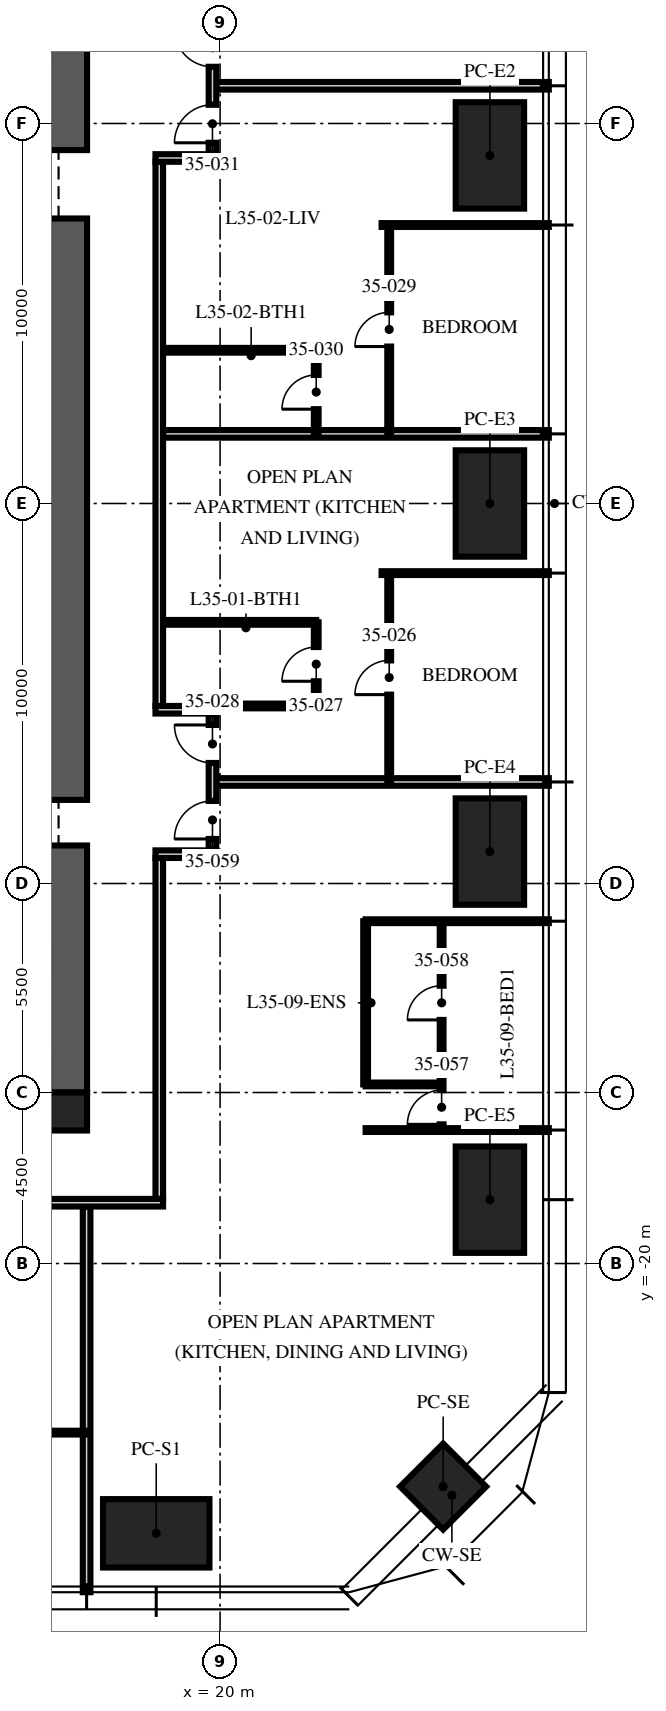
"""IFC4 building model, lengths in metres.
Left out: names, types, materials, properties, quantities, classifications, styles, units other than length and angle.
Written with IfcOpenShell. Run it as: python <this file> out.ifc"""

import sys

from ifc_helpers import new_model, si_unit, direction, frame, frame_2d, origin, origin_2d, place, context, subcontext, project, spatial, rectangle, extrude, element, fill, save


model = new_model("IFC4")
c1 = context("Model", 3, precision=1e-05, world=origin(), true_north=direction((0.0, 1.0)))
c2 = subcontext(c1, "Body", "Model", "MODEL_VIEW")
j1 = project(units=[si_unit("LENGTHUNIT", "METRE"), si_unit("PLANEANGLEUNIT", "RADIAN")], contexts=[c1])
p1 = place(None, origin())
s1 = spatial("IfcSite", under=j1, at=p1, CompositionType="ELEMENT")
p2 = place(p1, origin())
s2 = spatial("IfcBuilding", under=s1, at=p2, CompositionType="ELEMENT")
p3 = place(p2, frame((0.0, 0.0, 141.0)))
s3 = spatial("IfcBuildingStorey", under=s2, at=p3, CompositionType="ELEMENT", Elevation=141.0)
p4 = place(p3, frame((15.5, -15.5, -0.25), z_axis=(0.0, 0.0, 1.0), x_axis=(0.0, 1.0, 0.0)))
e1 = element("IfcWall", 1, at=p4, inside=s3, PredefinedType="SHEAR", context=c2, shape_type="SweptSolid", body=[
    extrude(rectangle(XDim=31.0, YDim=2.0, at=frame_2d((15.5, 0.0))), origin(), (0.0, 0.0, 1.0), 3.75),
])
p5 = place(p4, frame((6.5, 0.0, 0.25)))
e2 = element("IfcOpeningElement", 2, at=p5, cuts=e1, PredefinedType="OPENING", context=c2, shape_type="SweptSolid", body=[
    extrude(rectangle(XDim=1.2, YDim=2.1, at=frame_2d((0.6, 1.05))), frame((0.0, 1.01, 0.0), z_axis=(0.0, -1.0, 0.0), x_axis=(1.0, 0.0, 0.0)), (0.0, 0.0, 1.0), 2.02),
])
p6 = place(p4, frame((23.0, 0.0, 0.25)))
e3 = element("IfcOpeningElement", 3, at=p6, cuts=e1, PredefinedType="OPENING", context=c2, shape_type="SweptSolid", body=[
    extrude(rectangle(XDim=1.8, YDim=2.1, at=frame_2d((0.9, 1.05))), frame((0.0, 1.01, 0.0), z_axis=(0.0, -1.0, 0.0), x_axis=(1.0, 0.0, 0.0)), (0.0, 0.0, 1.0), 2.02),
])
p7 = place(p3, frame((16.0, -16.0, -0.25), z_axis=(0.0, 0.0, 1.0), x_axis=(1.0, 0.0, 0.0)))
e4 = element("IfcColumn", 4, at=p7, inside=s3, PredefinedType="COLUMN", context=c2, shape_type="SweptSolid", body=[
    extrude(rectangle(XDim=1.0, YDim=1.0, at=origin_2d()), origin(), (0.0, 0.0, 1.0), 3.75),
])
for number, where, z_axis, x_axis in (
    (5, (27.1, 9.16, 0.0), (0.0, 0.0, 1.0), (0.0, 1.0, 0.0)),
    (6, (27.1, 0.0, 0.0), (0.0, 0.0, 1.0), (0.0, 1.0, 0.0)),
    (7, (27.1, -9.16, 0.0), (0.0, 0.0, 1.0), (0.0, 1.0, 0.0)),
    (8, (27.1, -18.32, 0.0), (0.0, 0.0, 1.0), (0.0, 1.0, 0.0)),
    (9, (18.32, -27.1, 0.0), (0.0, 0.0, 1.0), (1.0, 0.0, 0.0)),
):
    element("IfcColumn", number, at=place(p3, frame(where, z_axis=z_axis, x_axis=x_axis)), inside=s3, PredefinedType="COLUMN", context=c2, shape_type="SweptSolid", body=[
        extrude(rectangle(XDim=2.8, YDim=1.8, at=origin_2d()), origin(), (0.0, 0.0, 1.0), 3.75),
    ])
p8 = place(p3, frame((25.87, -25.87, 0.0), z_axis=(0.0, 0.0, 1.0), x_axis=(0.707106781187, 0.707106781187, 0.0)))
e10 = element("IfcColumn", 10, at=p8, inside=s3, PredefinedType="COLUMN", context=c2, shape_type="SweptSolid", body=[
    extrude(rectangle(XDim=1.6, YDim=1.6, at=origin_2d()), origin(), (0.0, 0.0, 1.0), 3.75),
])
p9 = place(p3, frame((19.9, -7.328, 0.0), z_axis=(0.0, 0.0, 1.0), x_axis=(1.0, 0.0, 0.0)))
e11 = element("IfcWall", 11, at=p9, inside=s3, PredefinedType="PARTITIONING", context=c2, shape_type="SweptSolid", body=[
    extrude(rectangle(XDim=8.75, YDim=0.2, at=frame_2d((4.375, 0.0))), origin(), (0.0, 0.0, 1.0), 2.81),
])
p10 = place(p3, frame((24.25, -1.832, 0.0), z_axis=(0.0, 0.0, 1.0), x_axis=(1.0, 0.0, 0.0)))
e12 = element("IfcWall", 12, at=p10, inside=s3, PredefinedType="PARTITIONING", context=c2, shape_type="SweptSolid", body=[
    extrude(rectangle(XDim=4.4, YDim=0.1, at=frame_2d((2.2, 0.0))), origin(), (0.0, 0.0, 1.0), 2.81),
])
p11 = place(p3, frame((18.5, 1.832, 0.0), z_axis=(0.0, 0.0, 1.0), x_axis=(1.0, 0.0, 0.0)))
e13 = element("IfcWall", 13, at=p11, inside=s3, PredefinedType="PARTITIONING", context=c2, shape_type="SweptSolid", body=[
    extrude(rectangle(XDim=10.15, YDim=0.2, at=frame_2d((5.075, 0.0))), origin(), (0.0, 0.0, 1.0), 2.81),
])
p12 = place(p3, frame((24.25, 7.328, 0.0), z_axis=(0.0, 0.0, 1.0), x_axis=(1.0, 0.0, 0.0)))
e14 = element("IfcWall", 14, at=p12, inside=s3, PredefinedType="PARTITIONING", context=c2, shape_type="SweptSolid", body=[
    extrude(rectangle(XDim=4.4, YDim=0.1, at=frame_2d((2.2, 0.0))), origin(), (0.0, 0.0, 1.0), 2.81),
])
p13 = place(p3, frame((19.9, 10.992, 0.0), z_axis=(0.0, 0.0, 1.0), x_axis=(1.0, 0.0, 0.0)))
e15 = element("IfcWall", 15, at=p13, inside=s3, PredefinedType="PARTITIONING", context=c2, shape_type="SweptSolid", body=[
    extrude(rectangle(XDim=8.75, YDim=0.2, at=frame_2d((4.375, 0.0))), origin(), (0.0, 0.0, 1.0), 2.81),
])
p14 = place(p3, frame((16.488, -18.5, 0.0), z_axis=(0.0, 0.0, 1.0), x_axis=(0.0, -1.0, 0.0)))
e16 = element("IfcWall", 16, at=p14, inside=s3, PredefinedType="PARTITIONING", context=c2, shape_type="SweptSolid", body=[
    extrude(rectangle(XDim=10.15, YDim=0.2, at=frame_2d((5.075, 0.0))), origin(), (0.0, 0.0, 1.0), 2.81),
])
for number, where, z_axis, x_axis in (
    (17, (23.83, -16.488, 0.0), (0.0, 0.0, 1.0), (1.0, 0.0, 0.0)),
    (18, (23.83, -10.992, 0.0), (0.0, 0.0, 1.0), (1.0, 0.0, 0.0)),
):
    element("IfcWall", number, at=place(p3, frame(where, z_axis=z_axis, x_axis=x_axis)), inside=s3, PredefinedType="PARTITIONING", context=c2, shape_type="SweptSolid", body=[
        extrude(rectangle(XDim=4.82, YDim=0.1, at=frame_2d((2.41, 0.0))), origin(), (0.0, 0.0, 1.0), 2.81),
    ])
p15 = place(p3, frame((24.45, -7.328, 0.0), z_axis=(0.0, 0.0, 1.0), x_axis=(0.0, 1.0, 0.0)))
e19 = element("IfcWall", 19, at=p15, inside=s3, PredefinedType="PARTITIONING", context=c2, shape_type="SweptSolid", body=[
    extrude(rectangle(XDim=5.496, YDim=0.1, at=frame_2d((2.748, 0.0))), origin(), (0.0, 0.0, 1.0), 2.81),
])
p16 = place(p15, frame((2.298, 0.0, 0.0)))
e20 = element("IfcOpeningElement", 20, at=p16, cuts=e19, PredefinedType="OPENING", context=c2, shape_type="SweptSolid", body=[
    extrude(rectangle(XDim=0.9, YDim=2.1, at=frame_2d((0.45, 1.05))), frame((0.0, 0.06, 0.0), z_axis=(0.0, -1.0, 0.0), x_axis=(1.0, 0.0, 0.0)), (0.0, 0.0, 1.0), 0.12),
])
p17 = place(p3, frame((22.53, -5.328, 0.0), z_axis=(0.0, 0.0, 1.0), x_axis=(0.0, 1.0, 0.0)))
e21 = element("IfcWall", 21, at=p17, inside=s3, PredefinedType="PARTITIONING", context=c2, shape_type="SweptSolid", body=[
    extrude(rectangle(XDim=2.2, YDim=0.125, at=frame_2d((1.1, 0.0))), origin(), (0.0, 0.0, 1.0), 2.81),
])
p18 = place(p17, frame((0.65, 0.0, 0.0)))
e22 = element("IfcOpeningElement", 22, at=p18, cuts=e21, PredefinedType="OPENING", context=c2, shape_type="SweptSolid", body=[
    extrude(rectangle(XDim=0.9, YDim=2.1, at=frame_2d((0.45, 1.05))), frame((0.0, 0.073, 0.0), z_axis=(0.0, -1.0, 0.0), x_axis=(1.0, 0.0, 0.0)), (0.0, 0.0, 1.0), 0.145),
])
p19 = place(p3, frame((19.97, -5.328, 0.0), z_axis=(0.0, 0.0, 1.0), x_axis=(1.0, 0.0, 0.0)))
e23 = element("IfcWall", 23, at=p19, inside=s3, PredefinedType="PARTITIONING", context=c2, shape_type="SweptSolid", body=[
    extrude(rectangle(XDim=2.56, YDim=0.125, at=frame_2d((1.28, 0.0))), origin(), (0.0, 0.0, 1.0), 3.5),
])
p20 = place(p3, frame((18.5, -3.128, 0.0), z_axis=(0.0, 0.0, 1.0), x_axis=(1.0, 0.0, 0.0)))
e24 = element("IfcWall", 24, at=p20, inside=s3, PredefinedType="PARTITIONING", context=c2, shape_type="SweptSolid", body=[
    extrude(rectangle(XDim=4.03, YDim=0.125, at=frame_2d((2.015, 0.0))), origin(), (0.0, 0.0, 1.0), 3.5),
])
p21 = place(p3, frame((24.45, 1.832, 0.0), z_axis=(0.0, 0.0, 1.0), x_axis=(0.0, 1.0, 0.0)))
e25 = element("IfcWall", 25, at=p21, inside=s3, PredefinedType="PARTITIONING", context=c2, shape_type="SweptSolid", body=[
    extrude(rectangle(XDim=5.496, YDim=0.1, at=frame_2d((2.748, 0.0))), origin(), (0.0, 0.0, 1.0), 2.81),
])
p22 = place(p21, frame((2.298, 0.0, 0.0)))
e26 = element("IfcOpeningElement", 26, at=p22, cuts=e25, PredefinedType="OPENING", context=c2, shape_type="SweptSolid", body=[
    extrude(rectangle(XDim=0.9, YDim=2.1, at=frame_2d((0.45, 1.05))), frame((0.0, 0.06, 0.0), z_axis=(0.0, -1.0, 0.0), x_axis=(1.0, 0.0, 0.0)), (0.0, 0.0, 1.0), 0.12),
])
p23 = place(p3, frame((22.53, 1.832, 0.0), z_axis=(0.0, 0.0, 1.0), x_axis=(0.0, 1.0, 0.0)))
e27 = element("IfcWall", 27, at=p23, inside=s3, PredefinedType="PARTITIONING", context=c2, shape_type="SweptSolid", body=[
    extrude(rectangle(XDim=2.2, YDim=0.125, at=frame_2d((1.1, 0.0))), origin(), (0.0, 0.0, 1.0), 3.5),
])
p24 = place(p23, frame((0.65, 0.0, 0.0)))
e28 = element("IfcOpeningElement", 28, at=p24, cuts=e27, PredefinedType="OPENING", context=c2, shape_type="SweptSolid", body=[
    extrude(rectangle(XDim=0.9, YDim=2.1, at=frame_2d((0.45, 1.05))), frame((0.0, 0.073, 0.0), z_axis=(0.0, -1.0, 0.0), x_axis=(1.0, 0.0, 0.0)), (0.0, 0.0, 1.0), 0.145),
])
p25 = place(p3, frame((18.5, 4.032, 0.0), z_axis=(0.0, 0.0, 1.0), x_axis=(1.0, 0.0, 0.0)))
e29 = element("IfcWall", 29, at=p25, inside=s3, PredefinedType="PARTITIONING", context=c2, shape_type="SweptSolid", body=[
    extrude(rectangle(XDim=4.03, YDim=0.125, at=frame_2d((2.015, 0.0))), origin(), (0.0, 0.0, 1.0), 3.5),
])
p26 = place(p3, frame((10.992, -24.45, 0.0), z_axis=(0.0, 0.0, 1.0), x_axis=(1.0, 0.0, 0.0)))
e30 = element("IfcWall", 30, at=p26, inside=s3, PredefinedType="PARTITIONING", context=c2, shape_type="SweptSolid", body=[
    extrude(rectangle(XDim=5.496, YDim=0.1, at=frame_2d((2.748, 0.0))), origin(), (0.0, 0.0, 1.0), 2.81),
])
p27 = place(p26, frame((2.298, 0.0, 0.0)))
e31 = element("IfcOpeningElement", 31, at=p27, cuts=e30, PredefinedType="OPENING", context=c2, shape_type="SweptSolid", body=[
    extrude(rectangle(XDim=0.9, YDim=2.1, at=frame_2d((0.45, 1.05))), frame((0.0, 0.06, 0.0), z_axis=(0.0, -1.0, 0.0), x_axis=(1.0, 0.0, 0.0)), (0.0, 0.0, 1.0), 0.12),
])
p28 = place(p3, frame((25.83, -16.488, 0.0), z_axis=(0.0, 0.0, 1.0), x_axis=(0.0, 1.0, 0.0)))
e32 = element("IfcWall", 32, at=p28, inside=s3, PredefinedType="PARTITIONING", context=c2, shape_type="SweptSolid", body=[
    extrude(rectangle(XDim=5.496, YDim=0.1, at=frame_2d((2.748, 0.0))), origin(), (0.0, 0.0, 1.0), 2.81),
])
p29 = place(p28, frame((0.15, 0.0, 0.0)))
e33 = element("IfcOpeningElement", 33, at=p29, cuts=e32, PredefinedType="OPENING", context=c2, shape_type="SweptSolid", body=[
    extrude(rectangle(XDim=0.9, YDim=2.1, at=frame_2d((0.45, 1.05))), frame((0.0, 0.06, 0.0), z_axis=(0.0, -1.0, 0.0), x_axis=(1.0, 0.0, 0.0)), (0.0, 0.0, 1.0), 0.12),
])
p30 = place(p28, frame((2.898, 0.0, 0.0)))
e34 = element("IfcOpeningElement", 34, at=p30, cuts=e32, PredefinedType="OPENING", context=c2, shape_type="SweptSolid", body=[
    extrude(rectangle(XDim=0.9, YDim=2.1, at=frame_2d((0.45, 1.05))), frame((0.0, 0.06, 0.0), z_axis=(0.0, -1.0, 0.0), x_axis=(1.0, 0.0, 0.0)), (0.0, 0.0, 1.0), 0.12),
])
p31 = place(p3, frame((23.83, -15.288, 0.0), z_axis=(0.0, 0.0, 1.0), x_axis=(1.0, 0.0, 0.0)))
e35 = element("IfcWall", 35, at=p31, inside=s3, PredefinedType="PARTITIONING", context=c2, shape_type="SweptSolid", body=[
    extrude(rectangle(XDim=2.0, YDim=0.1, at=frame_2d((1.0, 0.0))), origin(), (0.0, 0.0, 1.0), 3.5),
])
p32 = place(p3, frame((23.83, -15.288, 0.0), z_axis=(0.0, 0.0, 1.0), x_axis=(0.0, 1.0, 0.0)))
e36 = element("IfcWall", 36, at=p32, inside=s3, PredefinedType="PARTITIONING", context=c2, shape_type="SweptSolid", body=[
    extrude(rectangle(XDim=4.296, YDim=0.125, at=frame_2d((2.148, 0.0))), origin(), (0.0, 0.0, 1.0), 2.81),
])
p33 = place(p3, frame((18.4, -18.3, 0.0), z_axis=(0.0, 0.0, 1.0), x_axis=(0.0, 1.0, 0.0)))
e37 = element("IfcWall", 37, at=p33, inside=s3, PredefinedType="PARTITIONING", context=c2, shape_type="SweptSolid", body=[
    extrude(rectangle(XDim=8.972, YDim=0.2, at=frame_2d((4.486, 0.0))), origin(), (0.0, 0.0, 1.0), 2.3),
])
p34 = place(p3, frame((18.3, -9.228, 0.0), z_axis=(0.0, 0.0, 1.0), x_axis=(1.0, 0.0, 0.0)))
e38 = element("IfcWall", 38, at=p34, inside=s3, PredefinedType="PARTITIONING", context=c2, shape_type="SweptSolid", body=[
    extrude(rectangle(XDim=1.6, YDim=0.2, at=frame_2d((0.8, 0.0))), origin(), (0.0, 0.0, 1.0), 2.7),
])
p35 = place(p3, frame((18.3, -5.428, 0.0), z_axis=(0.0, 0.0, 1.0), x_axis=(1.0, 0.0, 0.0)))
e39 = element("IfcWall", 39, at=p35, inside=s3, PredefinedType="PARTITIONING", context=c2, shape_type="SweptSolid", body=[
    extrude(rectangle(XDim=1.6, YDim=0.2, at=frame_2d((0.8, 0.0))), origin(), (0.0, 0.0, 1.0), 3.5),
])
p36 = place(p3, frame((19.8, -9.128, 0.0), z_axis=(0.0, 0.0, 1.0), x_axis=(0.0, 1.0, 0.0)))
e40 = element("IfcWall", 40, at=p36, inside=s3, PredefinedType="PARTITIONING", context=c2, shape_type="SweptSolid", body=[
    extrude(rectangle(XDim=3.6, YDim=0.2, at=frame_2d((1.8, 0.0))), origin(), (0.0, 0.0, 1.0), 2.7),
])
p37 = place(p36, frame((2.3, 0.0, 0.0)))
e41 = element("IfcOpeningElement", 41, at=p37, cuts=e40, PredefinedType="OPENING", context=c2, shape_type="SweptSolid", body=[
    extrude(rectangle(XDim=1.0, YDim=2.2, at=frame_2d((0.5, 1.1))), frame((0.0, 0.11, 0.0), z_axis=(0.0, -1.0, 0.0), x_axis=(1.0, 0.0, 0.0)), (0.0, 0.0, 1.0), 0.22),
])
p38 = place(p36, frame((0.3, 0.0, 0.0)))
e42 = element("IfcOpeningElement", 42, at=p38, cuts=e40, PredefinedType="OPENING", context=c2, shape_type="SweptSolid", body=[
    extrude(rectangle(XDim=1.0, YDim=2.2, at=frame_2d((0.5, 1.1))), frame((0.0, 0.11, 0.0), z_axis=(0.0, -1.0, 0.0), x_axis=(1.0, 0.0, 0.0)), (0.0, 0.0, 1.0), 0.22),
])
p39 = place(p3, frame((18.4, -5.328, 0.0), z_axis=(0.0, 0.0, 1.0), x_axis=(0.0, 1.0, 0.0)))
e43 = element("IfcWall", 43, at=p39, inside=s3, PredefinedType="PARTITIONING", context=c2, shape_type="SweptSolid", body=[
    extrude(rectangle(XDim=14.32, YDim=0.2, at=frame_2d((7.16, 0.0))), origin(), (0.0, 0.0, 1.0), 2.7),
])
p40 = place(p3, frame((18.3, 9.092, 0.0), z_axis=(0.0, 0.0, 1.0), x_axis=(1.0, 0.0, 0.0)))
e44 = element("IfcWall", 44, at=p40, inside=s3, PredefinedType="PARTITIONING", context=c2, shape_type="SweptSolid", body=[
    extrude(rectangle(XDim=1.6, YDim=0.2, at=frame_2d((0.8, 0.0))), origin(), (0.0, 0.0, 1.0), 2.7),
])
p41 = place(p3, frame((19.8, 9.192, 0.0), z_axis=(0.0, 0.0, 1.0), x_axis=(0.0, 1.0, 0.0)))
e45 = element("IfcWall", 45, at=p41, inside=s3, PredefinedType="PARTITIONING", context=c2, shape_type="SweptSolid", body=[
    extrude(rectangle(XDim=3.6, YDim=0.2, at=frame_2d((1.8, 0.0))), origin(), (0.0, 0.0, 1.0), 2.7),
])
p42 = place(p41, frame((0.3, 0.0, 0.0)))
e46 = element("IfcOpeningElement", 46, at=p42, cuts=e45, PredefinedType="OPENING", context=c2, shape_type="SweptSolid", body=[
    extrude(rectangle(XDim=1.0, YDim=2.2, at=frame_2d((0.5, 1.1))), frame((0.0, 0.11, 0.0), z_axis=(0.0, -1.0, 0.0), x_axis=(1.0, 0.0, 0.0)), (0.0, 0.0, 1.0), 0.22),
])
p43 = place(p41, frame((2.3, 0.0, 0.0)))
e47 = element("IfcOpeningElement", 47, at=p43, cuts=e45, PredefinedType="OPENING", context=c2, shape_type="SweptSolid", body=[
    extrude(rectangle(XDim=1.0, YDim=2.2, at=frame_2d((0.5, 1.1))), frame((0.0, 0.11, 0.0), z_axis=(0.0, -1.0, 0.0), x_axis=(1.0, 0.0, 0.0)), (0.0, 0.0, 1.0), 0.22),
])
p44 = place(p3, frame((18.5, -18.4, 0.0), z_axis=(0.0, 0.0, 1.0), x_axis=(-1.0, 0.0, 0.0)))
e48 = element("IfcWall", 48, at=p44, inside=s3, PredefinedType="PARTITIONING", context=c2, shape_type="SweptSolid", body=[
    extrude(rectangle(XDim=12.9, YDim=0.2, at=frame_2d((6.45, 0.0))), origin(), (0.0, 0.0, 1.0), 2.3),
])
p45 = place(p16, origin())
e49 = element("IfcDoor", 49, at=p45, inside=s3, OperationType="SINGLE_SWING_LEFT", PredefinedType="DOOR", context=c2, shape_type="SweptSolid", body=[
    extrude(rectangle(XDim=0.9, YDim=2.1, at=frame_2d((0.45, 1.05))), frame((0.0, 0.025, 0.0), z_axis=(0.0, -1.0, 0.0), x_axis=(1.0, 0.0, 0.0)), (0.0, 0.0, 1.0), 0.05),
])
fill(e20, e49)
p46 = place(p18, origin())
e50 = element("IfcDoor", 50, at=p46, inside=s3, OperationType="SINGLE_SWING_LEFT", PredefinedType="DOOR", context=c2, shape_type="SweptSolid", body=[
    extrude(rectangle(XDim=0.9, YDim=2.1, at=frame_2d((0.45, 1.05))), frame((0.0, 0.025, 0.0), z_axis=(0.0, -1.0, 0.0), x_axis=(1.0, 0.0, 0.0)), (0.0, 0.0, 1.0), 0.05),
])
fill(e22, e50)
p47 = place(p37, origin())
e51 = element("IfcDoor", 51, at=p47, inside=s3, OperationType="SINGLE_SWING_RIGHT", PredefinedType="DOOR", context=c2, shape_type="SweptSolid", body=[
    extrude(rectangle(XDim=1.0, YDim=2.2, at=frame_2d((0.5, 1.1))), frame((0.0, 0.025, 0.0), z_axis=(0.0, -1.0, 0.0), x_axis=(1.0, 0.0, 0.0)), (0.0, 0.0, 1.0), 0.05),
])
fill(e41, e51)
p48 = place(p22, origin())
e52 = element("IfcDoor", 52, at=p48, inside=s3, OperationType="SINGLE_SWING_LEFT", PredefinedType="DOOR", context=c2, shape_type="SweptSolid", body=[
    extrude(rectangle(XDim=0.9, YDim=2.1, at=frame_2d((0.45, 1.05))), frame((0.0, 0.025, 0.0), z_axis=(0.0, -1.0, 0.0), x_axis=(1.0, 0.0, 0.0)), (0.0, 0.0, 1.0), 0.05),
])
fill(e26, e52)
p49 = place(p24, origin())
e53 = element("IfcDoor", 53, at=p49, inside=s3, OperationType="SINGLE_SWING_LEFT", PredefinedType="DOOR", context=c2, shape_type="SweptSolid", body=[
    extrude(rectangle(XDim=0.9, YDim=2.1, at=frame_2d((0.45, 1.05))), frame((0.0, 0.025, 0.0), z_axis=(0.0, -1.0, 0.0), x_axis=(1.0, 0.0, 0.0)), (0.0, 0.0, 1.0), 0.05),
])
fill(e28, e53)
p50 = place(p42, origin())
e54 = element("IfcDoor", 54, at=p50, inside=s3, OperationType="SINGLE_SWING_LEFT", PredefinedType="DOOR", context=c2, shape_type="SweptSolid", body=[
    extrude(rectangle(XDim=1.0, YDim=2.2, at=frame_2d((0.5, 1.1))), frame((0.0, 0.025, 0.0), z_axis=(0.0, -1.0, 0.0), x_axis=(1.0, 0.0, 0.0)), (0.0, 0.0, 1.0), 0.05),
])
fill(e46, e54)
p51 = place(p43, origin())
e55 = element("IfcDoor", 55, at=p51, inside=s3, OperationType="SINGLE_SWING_RIGHT", PredefinedType="DOOR", context=c2, shape_type="SweptSolid", body=[
    extrude(rectangle(XDim=1.0, YDim=2.2, at=frame_2d((0.5, 1.1))), frame((0.0, 0.025, 0.0), z_axis=(0.0, -1.0, 0.0), x_axis=(1.0, 0.0, 0.0)), (0.0, 0.0, 1.0), 0.05),
])
fill(e47, e55)
p52 = place(p29, origin())
e56 = element("IfcDoor", 56, at=p52, inside=s3, OperationType="SINGLE_SWING_LEFT", PredefinedType="DOOR", context=c2, shape_type="SweptSolid", body=[
    extrude(rectangle(XDim=0.9, YDim=2.1, at=frame_2d((0.45, 1.05))), frame((0.0, 0.025, 0.0), z_axis=(0.0, -1.0, 0.0), x_axis=(1.0, 0.0, 0.0)), (0.0, 0.0, 1.0), 0.05),
])
fill(e33, e56)
p53 = place(p30, origin())
e57 = element("IfcDoor", 57, at=p53, inside=s3, OperationType="SINGLE_SWING_LEFT", PredefinedType="DOOR", context=c2, shape_type="SweptSolid", body=[
    extrude(rectangle(XDim=0.9, YDim=2.1, at=frame_2d((0.45, 1.05))), frame((0.0, 0.025, 0.0), z_axis=(0.0, -1.0, 0.0), x_axis=(1.0, 0.0, 0.0)), (0.0, 0.0, 1.0), 0.05),
])
fill(e34, e57)
p54 = place(p38, origin())
e58 = element("IfcDoor", 58, at=p54, inside=s3, OperationType="SINGLE_SWING_LEFT", PredefinedType="DOOR", context=c2, shape_type="SweptSolid", body=[
    extrude(rectangle(XDim=1.0, YDim=2.2, at=frame_2d((0.5, 1.1))), frame((0.0, 0.025, 0.0), z_axis=(0.0, -1.0, 0.0), x_axis=(1.0, 0.0, 0.0)), (0.0, 0.0, 1.0), 0.05),
])
fill(e42, e58)
save(model, sys.argv[1])
